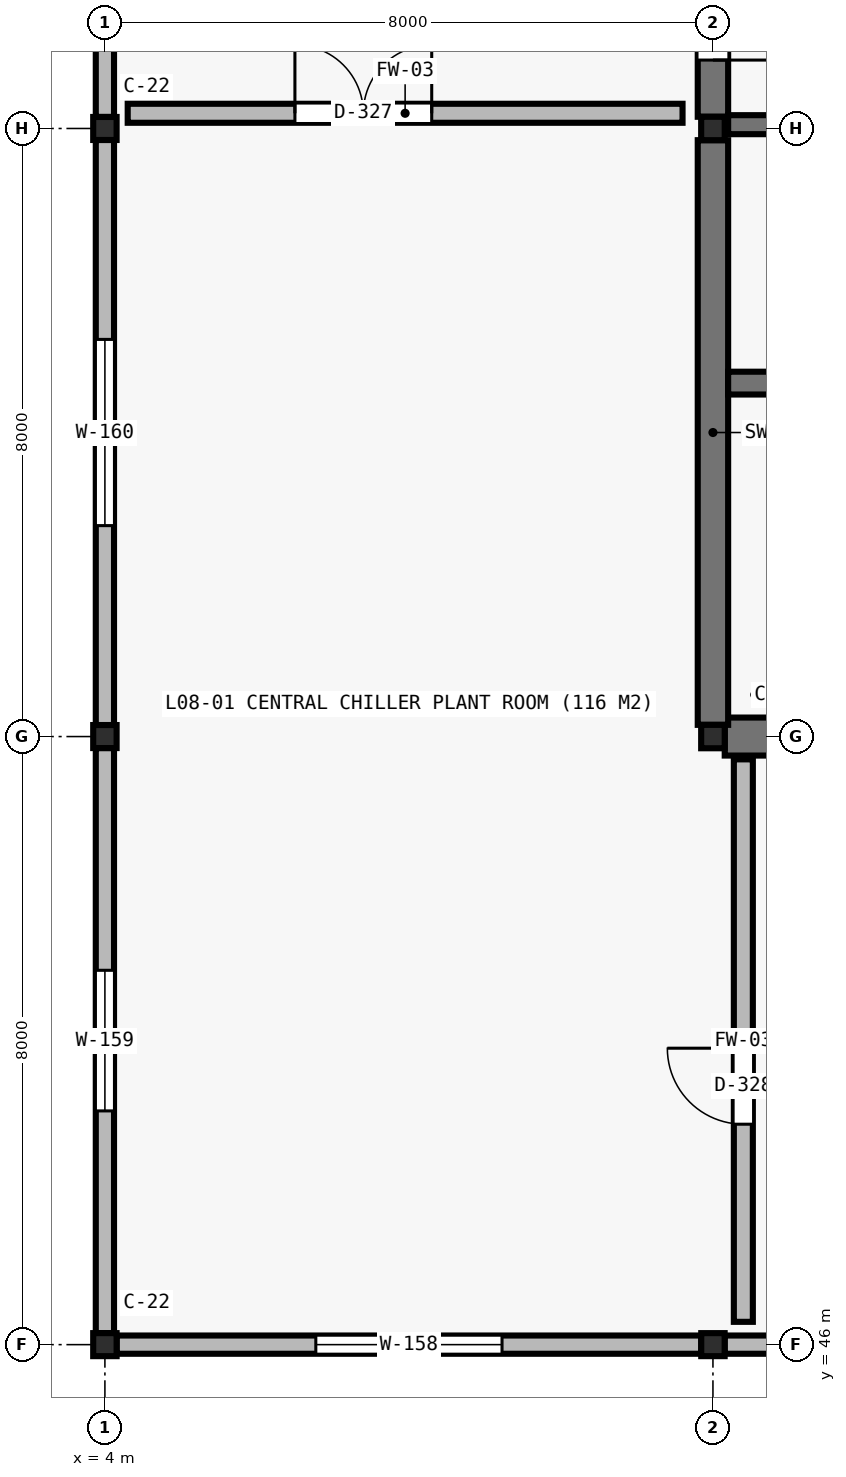
"""IFC4 building model, lengths in metres.
Left out: names, types, materials, properties, quantities, classifications, styles, units other than length and angle.
Written with IfcOpenShell. Run it as: python <this file> out.ifc"""

import sys

from ifc_helpers import new_model, si_unit, direction, frame, frame_2d, origin, origin_2d, place, context, subcontext, project, spatial, rectangle, i_section, extrude, element, fill, save


model = new_model("IFC4")
c1 = context("Model", 3, precision=1e-05, world=origin(), true_north=direction((0.0, 1.0)))
c2 = subcontext(c1, "Body", "Model", "MODEL_VIEW")
j1 = project(units=[si_unit("LENGTHUNIT", "METRE"), si_unit("PLANEANGLEUNIT", "RADIAN")], contexts=[c1])
p1 = place(None, origin())
s1 = spatial("IfcSite", under=j1, at=p1, CompositionType="ELEMENT")
p2 = place(p1, origin())
s2 = spatial("IfcBuilding", under=s1, at=p2, CompositionType="ELEMENT")
p3 = place(p2, frame((0.0, 0.0, 36.4)))
s3 = spatial("IfcBuildingStorey", under=s2, at=p3, CompositionType="ELEMENT", Elevation=36.4)
for number, where, z_axis, x_axis in (
    (1, (4.0, 46.0, 0.0), (0.0, 0.0, 1.0), (1.0, 0.0, 0.0)),
    (2, (4.0, 54.0, 0.0), (0.0, 0.0, 1.0), (1.0, 0.0, 0.0)),
    (3, (4.0, 62.0, 0.0), (0.0, 0.0, 1.0), (1.0, 0.0, 0.0)),
    (4, (12.0, 46.0, 0.0), (0.0, 0.0, 1.0), (1.0, 0.0, 0.0)),
):
    element("IfcColumn", number, at=place(p3, frame(where, z_axis=z_axis, x_axis=x_axis)), inside=s3, PredefinedType="COLUMN", context=c2, shape_type="SweptSolid", body=[
        extrude(i_section(OverallWidth=0.308, OverallDepth=0.303, WebThickness=0.013, FlangeThickness=0.013, at=origin_2d()), origin(), (0.0, 0.0, 1.0), 3.98),
    ])
for number, where, z_axis, x_axis in (
    (5, (12.0, 54.0, 0.0), (0.0, 0.0, 1.0), (1.0, 0.0, 0.0)),
    (6, (12.0, 62.0, 0.0), (0.0, 0.0, 1.0), (1.0, 0.0, 0.0)),
):
    element("IfcColumn", number, at=place(p3, frame(where, z_axis=z_axis, x_axis=x_axis)), inside=s3, PredefinedType="COLUMN", context=c2, shape_type="SweptSolid", body=[
        extrude(i_section(OverallWidth=0.31, OverallDepth=0.308, WebThickness=0.015, FlangeThickness=0.015, at=origin_2d()), origin(), (0.0, 0.0, 1.0), 3.98),
    ])
p4 = place(p3, frame((12.155, 54.0, 0.0), z_axis=(0.0, 0.0, 1.0), x_axis=(1.0, 0.0, 0.0)))
e7 = element("IfcWall", 7, at=p4, inside=s3, PredefinedType="SHEAR", context=c2, shape_type="SweptSolid", body=[
    extrude(rectangle(XDim=7.845, YDim=0.5, at=frame_2d((3.922, 0.0))), origin(), (0.0, 0.0, 1.0), 3.98),
])
p5 = place(p3, frame((12.0, 54.154, 0.0), z_axis=(0.0, 0.0, 1.0), x_axis=(0.0, 1.0, 0.0)))
e8 = element("IfcWall", 8, at=p5, inside=s3, PredefinedType="SHEAR", context=c2, shape_type="SweptSolid", body=[
    extrude(rectangle(XDim=7.692, YDim=0.4, at=frame_2d((3.846, 0.0))), origin(), (0.0, 0.0, 1.0), 3.98),
])
p6 = place(p3, frame((12.0, 62.154, 0.0), z_axis=(0.0, 0.0, 1.0), x_axis=(0.0, 1.0, 0.0)))
e9 = element("IfcWall", 9, at=p6, inside=s3, PredefinedType="SHEAR", context=c2, shape_type="SweptSolid", body=[
    extrude(rectangle(XDim=7.692, YDim=0.4, at=frame_2d((3.846, 0.0))), origin(), (0.0, 0.0, 1.0), 3.98),
])
p7 = place(p6, frame((0.746, 0.0, 0.0)))
e10 = element("IfcOpeningElement", 10, at=p7, cuts=e9, PredefinedType="OPENING", context=c2, shape_type="SweptSolid", body=[
    extrude(rectangle(XDim=1.8, YDim=2.2, at=frame_2d((0.9, 1.1))), frame((0.0, 0.21, 0.0), z_axis=(0.0, -1.0, 0.0), x_axis=(1.0, 0.0, 0.0)), (0.0, 0.0, 1.0), 0.42),
])
p8 = place(p3, frame((12.2, 58.65, 0.0), z_axis=(0.0, 0.0, 1.0), x_axis=(1.0, 0.0, 0.0)))
e11 = element("IfcWall", 11, at=p8, inside=s3, PredefinedType="SHEAR", context=c2, shape_type="SweptSolid", body=[
    extrude(rectangle(XDim=9.75, YDim=0.3, at=frame_2d((4.875, 0.0))), origin(), (0.0, 0.0, 1.0), 3.98),
])
p9 = place(p8, frame((0.55, 0.0, 0.0)))
e12 = element("IfcOpeningElement", 12, at=p9, cuts=e11, PredefinedType="OPENING", context=c2, shape_type="SweptSolid", body=[
    extrude(rectangle(XDim=1.2, YDim=2.2, at=frame_2d((0.6, 1.1))), frame((0.0, 0.16, 0.0), z_axis=(0.0, -1.0, 0.0), x_axis=(1.0, 0.0, 0.0)), (0.0, 0.0, 1.0), 0.32),
])
p10 = place(p3, frame((12.2, 62.05, 0.0), z_axis=(0.0, 0.0, 1.0), x_axis=(1.0, 0.0, 0.0)))
e13 = element("IfcWall", 13, at=p10, inside=s3, PredefinedType="SHEAR", context=c2, shape_type="SweptSolid", body=[
    extrude(rectangle(XDim=16.55, YDim=0.25, at=frame_2d((8.275, 0.0))), origin(), (0.0, 0.0, 1.0), 3.98),
])
p11 = place(p10, frame((2.6, 0.0, 0.0)))
e14 = element("IfcOpeningElement", 14, at=p11, cuts=e13, PredefinedType="OPENING", context=c2, shape_type="SweptSolid", body=[
    extrude(rectangle(XDim=1.12, YDim=2.22, at=frame_2d((0.56, 1.11))), frame((0.0, 0.135, 0.0), z_axis=(0.0, -1.0, 0.0), x_axis=(1.0, 0.0, 0.0)), (0.0, 0.0, 1.0), 0.27),
])
p12 = place(p10, frame((11.2, 0.0, 0.0)))
e15 = element("IfcOpeningElement", 15, at=p12, cuts=e13, PredefinedType="OPENING", context=c2, shape_type="SweptSolid", body=[
    extrude(rectangle(XDim=1.12, YDim=2.22, at=frame_2d((0.56, 1.11))), frame((0.0, 0.135, 0.0), z_axis=(0.0, -1.0, 0.0), x_axis=(1.0, 0.0, 0.0)), (0.0, 0.0, 1.0), 0.27),
])
p13 = place(p3, frame((19.846, 46.0, 0.0), z_axis=(0.0, 0.0, 1.0), x_axis=(-1.0, 0.0, 0.0)))
e16 = element("IfcWall", 16, at=p13, inside=s3, PredefinedType="STANDARD", context=c2, shape_type="SweptSolid", body=[
    extrude(rectangle(XDim=7.692, YDim=0.24, at=frame_2d((3.846, 0.0))), origin(), (0.0, 0.0, 1.0), 3.573),
])
p14 = place(p13, frame((2.921, 0.0, 0.95)))
e17 = element("IfcOpeningElement", 17, at=p14, cuts=e16, PredefinedType="OPENING", context=c2, shape_type="SweptSolid", body=[
    extrude(rectangle(XDim=1.85, YDim=1.25, at=frame_2d((0.925, 0.625))), frame((0.0, 0.13, 0.0), z_axis=(0.0, -1.0, 0.0), x_axis=(1.0, 0.0, 0.0)), (0.0, 0.0, 1.0), 0.26),
])
p15 = place(p3, frame((11.846, 46.0, 0.0), z_axis=(0.0, 0.0, 1.0), x_axis=(-1.0, 0.0, 0.0)))
e18 = element("IfcWall", 18, at=p15, inside=s3, PredefinedType="STANDARD", context=c2, shape_type="SweptSolid", body=[
    extrude(rectangle(XDim=7.692, YDim=0.24, at=frame_2d((3.846, 0.0))), origin(), (0.0, 0.0, 1.0), 3.573),
])
p16 = place(p15, frame((2.621, 0.0, 0.95)))
e19 = element("IfcOpeningElement", 19, at=p16, cuts=e18, PredefinedType="OPENING", context=c2, shape_type="SweptSolid", body=[
    extrude(rectangle(XDim=2.45, YDim=1.35, at=frame_2d((1.225, 0.675))), frame((0.0, 0.13, 0.0), z_axis=(0.0, -1.0, 0.0), x_axis=(1.0, 0.0, 0.0)), (0.0, 0.0, 1.0), 0.26),
])
p17 = place(p3, frame((4.0, 46.152, 0.0), z_axis=(0.0, 0.0, 1.0), x_axis=(0.0, 1.0, 0.0)))
e20 = element("IfcWall", 20, at=p17, inside=s3, PredefinedType="STANDARD", context=c2, shape_type="SweptSolid", body=[
    extrude(rectangle(XDim=7.697, YDim=0.24, at=frame_2d((3.848, 0.0))), origin(), (0.0, 0.0, 1.0), 3.573),
])
p18 = place(p17, frame((2.924, 0.0, 0.95)))
e21 = element("IfcOpeningElement", 21, at=p18, cuts=e20, PredefinedType="OPENING", context=c2, shape_type="SweptSolid", body=[
    extrude(rectangle(XDim=1.85, YDim=1.25, at=frame_2d((0.925, 0.625))), frame((0.0, 0.13, 0.0), z_axis=(0.0, -1.0, 0.0), x_axis=(1.0, 0.0, 0.0)), (0.0, 0.0, 1.0), 0.26),
])
p19 = place(p3, frame((4.0, 54.152, 0.0), z_axis=(0.0, 0.0, 1.0), x_axis=(0.0, 1.0, 0.0)))
e22 = element("IfcWall", 22, at=p19, inside=s3, PredefinedType="STANDARD", context=c2, shape_type="SweptSolid", body=[
    extrude(rectangle(XDim=7.697, YDim=0.24, at=frame_2d((3.848, 0.0))), origin(), (0.0, 0.0, 1.0), 3.573),
])
p20 = place(p19, frame((2.624, 0.0, 0.95)))
e23 = element("IfcOpeningElement", 23, at=p20, cuts=e22, PredefinedType="OPENING", context=c2, shape_type="SweptSolid", body=[
    extrude(rectangle(XDim=2.45, YDim=1.35, at=frame_2d((1.225, 0.675))), frame((0.0, 0.13, 0.0), z_axis=(0.0, -1.0, 0.0), x_axis=(1.0, 0.0, 0.0)), (0.0, 0.0, 1.0), 0.26),
])
p21 = place(p3, frame((4.0, 62.152, 0.0), z_axis=(0.0, 0.0, 1.0), x_axis=(0.0, 1.0, 0.0)))
e24 = element("IfcWall", 24, at=p21, inside=s3, PredefinedType="STANDARD", context=c2, shape_type="SweptSolid", body=[
    extrude(rectangle(XDim=7.697, YDim=0.24, at=frame_2d((3.848, 0.0))), origin(), (0.0, 0.0, 1.0), 3.573),
])
p22 = place(p21, frame((2.924, 0.0, 0.95)))
e25 = element("IfcOpeningElement", 25, at=p22, cuts=e24, PredefinedType="OPENING", context=c2, shape_type="SweptSolid", body=[
    extrude(rectangle(XDim=1.85, YDim=1.25, at=frame_2d((0.925, 0.625))), frame((0.0, 0.13, 0.0), z_axis=(0.0, -1.0, 0.0), x_axis=(1.0, 0.0, 0.0)), (0.0, 0.0, 1.0), 0.26),
])
p23 = place(p3, frame((4.3, 62.2, 0.0), z_axis=(0.0, 0.0, 1.0), x_axis=(1.0, 0.0, 0.0)))
e26 = element("IfcWall", 26, at=p23, inside=s3, PredefinedType="SOLIDWALL", context=c2, shape_type="SweptSolid", body=[
    extrude(rectangle(XDim=7.3, YDim=0.25, at=frame_2d((3.65, 0.0))), origin(), (0.0, 0.0, 1.0), 3.98),
])
p24 = place(p23, frame((2.2, 0.0, 0.0)))
e27 = element("IfcOpeningElement", 27, at=p24, cuts=e26, PredefinedType="OPENING", context=c2, shape_type="SweptSolid", body=[
    extrude(rectangle(XDim=1.8, YDim=2.2, at=frame_2d((0.9, 1.1))), frame((0.0, 0.135, 0.0), z_axis=(0.0, -1.0, 0.0), x_axis=(1.0, 0.0, 0.0)), (0.0, 0.0, 1.0), 0.27),
])
p25 = place(p3, frame((12.4, 46.3, 0.0), z_axis=(0.0, 0.0, 1.0), x_axis=(0.0, 1.0, 0.0)))
e28 = element("IfcWall", 28, at=p25, inside=s3, PredefinedType="SOLIDWALL", context=c2, shape_type="SweptSolid", body=[
    extrude(rectangle(XDim=7.4, YDim=0.25, at=frame_2d((3.7, 0.0))), origin(), (0.0, 0.0, 1.0), 3.98),
])
p26 = place(p25, frame((2.6, 0.0, 0.0)))
e29 = element("IfcOpeningElement", 29, at=p26, cuts=e28, PredefinedType="OPENING", context=c2, shape_type="SweptSolid", body=[
    extrude(rectangle(XDim=1.0, YDim=2.15, at=frame_2d((0.5, 1.075))), frame((0.0, 0.135, 0.0), z_axis=(0.0, -1.0, 0.0), x_axis=(1.0, 0.0, 0.0)), (0.0, 0.0, 1.0), 0.27),
])
p27 = place(p16, origin())
e30 = element("IfcWindow", 30, at=p27, inside=s3, PartitioningType="SINGLE_PANEL", PredefinedType="WINDOW", context=c2, shape_type="SweptSolid", body=[
    extrude(rectangle(XDim=2.45, YDim=1.35, at=frame_2d((1.225, 0.675))), frame((0.0, 0.03, 0.0), z_axis=(0.0, -1.0, 0.0), x_axis=(1.0, 0.0, 0.0)), (0.0, 0.0, 1.0), 0.06),
])
fill(e19, e30)
p28 = place(p18, origin())
e31 = element("IfcWindow", 31, at=p28, inside=s3, PartitioningType="SINGLE_PANEL", PredefinedType="WINDOW", context=c2, shape_type="SweptSolid", body=[
    extrude(rectangle(XDim=1.85, YDim=1.25, at=frame_2d((0.925, 0.625))), frame((0.0, 0.03, 0.0), z_axis=(0.0, -1.0, 0.0), x_axis=(1.0, 0.0, 0.0)), (0.0, 0.0, 1.0), 0.06),
])
fill(e21, e31)
p29 = place(p20, origin())
e32 = element("IfcWindow", 32, at=p29, inside=s3, PartitioningType="SINGLE_PANEL", PredefinedType="WINDOW", context=c2, shape_type="SweptSolid", body=[
    extrude(rectangle(XDim=2.45, YDim=1.35, at=frame_2d((1.225, 0.675))), frame((0.0, 0.03, 0.0), z_axis=(0.0, -1.0, 0.0), x_axis=(1.0, 0.0, 0.0)), (0.0, 0.0, 1.0), 0.06),
])
fill(e23, e32)
p30 = place(p7, frame((1.8, 0.0, 0.0), z_axis=(0.0, 0.0, 1.0), x_axis=(-1.0, 0.0, 0.0)))
e33 = element("IfcDoor", 33, at=p30, inside=s3, OperationType="DOUBLE_DOOR_SINGLE_SWING", PredefinedType="DOOR", context=c2, shape_type="SweptSolid", body=[
    extrude(rectangle(XDim=1.8, YDim=2.2, at=frame_2d((0.9, 1.1))), frame((0.0, 0.025, 0.0), z_axis=(0.0, -1.0, 0.0), x_axis=(1.0, 0.0, 0.0)), (0.0, 0.0, 1.0), 0.05),
])
fill(e10, e33)
p31 = place(p24, origin())
e34 = element("IfcDoor", 34, at=p31, inside=s3, OperationType="DOUBLE_DOOR_SINGLE_SWING", PredefinedType="DOOR", context=c2, shape_type="SweptSolid", body=[
    extrude(rectangle(XDim=1.8, YDim=2.2, at=frame_2d((0.9, 1.1))), frame((0.0, 0.025, 0.0), z_axis=(0.0, -1.0, 0.0), x_axis=(1.0, 0.0, 0.0)), (0.0, 0.0, 1.0), 0.05),
])
fill(e27, e34)
p32 = place(p26, origin())
e35 = element("IfcDoor", 35, at=p32, inside=s3, OperationType="SINGLE_SWING_RIGHT", PredefinedType="DOOR", context=c2, shape_type="SweptSolid", body=[
    extrude(rectangle(XDim=1.0, YDim=2.15, at=frame_2d((0.5, 1.075))), frame((0.0, 0.025, 0.0), z_axis=(0.0, -1.0, 0.0), x_axis=(1.0, 0.0, 0.0)), (0.0, 0.0, 1.0), 0.05),
])
fill(e29, e35)
save(model, sys.argv[1])
